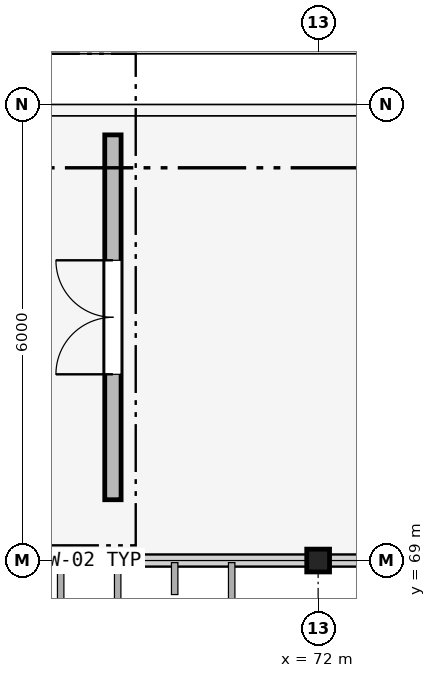
"""IFC4 building model, lengths in metres.
Left out: names, types, materials, properties, quantities, classifications, styles, units other than length and angle.
Written with IfcOpenShell. Run it as: python <this file> out.ifc"""

import sys

from ifc_helpers import new_model, si_unit, direction, frame, frame_2d, origin, origin_2d, place, context, subcontext, project, spatial, rectangle, hollow_rectangle, extrude, element, fill, save


model = new_model("IFC4")
c1 = context("Model", 3, precision=1e-05, world=origin(), true_north=direction((0.0, 1.0)))
c2 = subcontext(c1, "Body", "Model", "MODEL_VIEW")
j1 = project(units=[si_unit("LENGTHUNIT", "METRE"), si_unit("PLANEANGLEUNIT", "RADIAN")], contexts=[c1])
p1 = place(None, origin())
s1 = spatial("IfcSite", under=j1, at=p1, CompositionType="ELEMENT")
p2 = place(p1, origin())
s2 = spatial("IfcBuilding", under=s1, at=p2, CompositionType="ELEMENT")
p3 = place(p2, frame((0.0, 0.0, 18.0)))
s3 = spatial("IfcBuildingStorey", under=s2, at=p3, CompositionType="ELEMENT", Elevation=18.0)
p4 = place(p3, frame((72.0, 69.0, 0.0), z_axis=(0.0, 0.0, 1.0), x_axis=(1.0, 0.0, 0.0)))
e1 = element("IfcColumn", 1, at=p4, inside=s3, PredefinedType="COLUMN", context=c2, shape_type="SweptSolid", body=[
    extrude(hollow_rectangle(XDim=0.3, YDim=0.3, WallThickness=0.016, InnerFilletRadius=0.016, OuterFilletRadius=0.032, at=origin_2d()), origin(), (0.0, 0.0, 1.0), 4.2),
])
p5 = place(p3, frame((69.3, 69.8, 0.0), z_axis=(0.0, 0.0, 1.0), x_axis=(0.0, 1.0, 0.0)))
e2 = element("IfcWall", 2, at=p5, inside=s3, PredefinedType="PARTITIONING", context=c2, shape_type="SweptSolid", body=[
    extrude(rectangle(XDim=4.8, YDim=0.215, at=frame_2d((2.4, 0.0))), origin(), (0.0, 0.0, 1.0), 3.89),
])
p6 = place(p5, frame((1.65, 0.0, 0.0)))
e3 = element("IfcOpeningElement", 3, at=p6, cuts=e2, PredefinedType="OPENING", context=c2, shape_type="SweptSolid", body=[
    extrude(rectangle(XDim=1.5, YDim=2.15, at=frame_2d((0.75, 1.075))), frame((0.0, 0.117, 0.0), z_axis=(0.0, -1.0, 0.0), x_axis=(1.0, 0.0, 0.0)), (0.0, 0.0, 1.0), 0.235),
])
p7 = place(p6, origin())
e4 = element("IfcDoor", 4, at=p7, inside=s3, OperationType="DOUBLE_DOOR_SINGLE_SWING", PredefinedType="DOOR", context=c2, shape_type="SweptSolid", body=[
    extrude(rectangle(XDim=1.5, YDim=2.15, at=frame_2d((0.75, 1.075))), frame((0.0, 0.025, 0.0), z_axis=(0.0, -1.0, 0.0), x_axis=(1.0, 0.0, 0.0)), (0.0, 0.0, 1.0), 0.05),
])
fill(e3, e4)
save(model, sys.argv[1])
